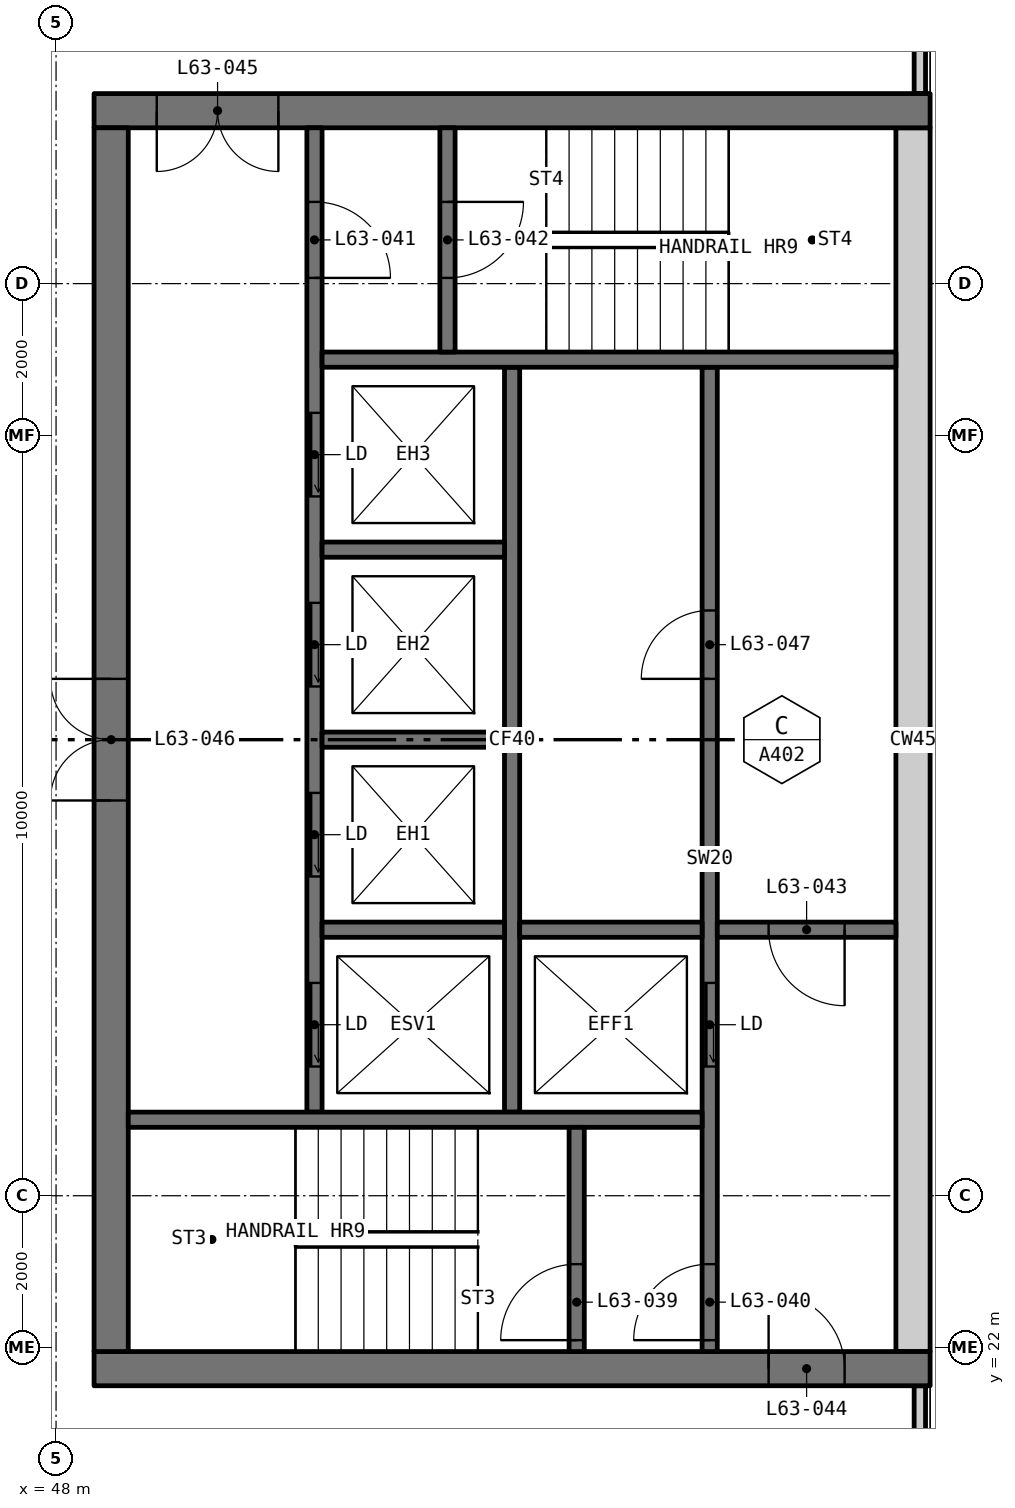
"""IFC4 building model, lengths in metres.
Left out: names, types, materials, properties, quantities, classifications, styles, units other than length and angle.
Written with IfcOpenShell. Run it as: python <this file> out.ifc"""

import sys

from ifc_helpers import new_model, si_unit, direction, frame, frame_2d, origin, place, context, subcontext, project, spatial, rectangle, extrude, element, fill, save


model = new_model("IFC4")
c1 = context("Model", 3, precision=1e-05, world=origin(), true_north=direction((0.0, 1.0)))
c2 = subcontext(c1, "Body", "Model", "MODEL_VIEW")
j1 = project(units=[si_unit("LENGTHUNIT", "METRE"), si_unit("PLANEANGLEUNIT", "RADIAN")], contexts=[c1])
p1 = place(None, origin())
s1 = spatial("IfcSite", under=j1, at=p1, CompositionType="ELEMENT")
p2 = place(p1, origin())
s2 = spatial("IfcBuilding", under=s1, at=p2, CompositionType="ELEMENT")
p3 = place(p2, frame((0.0, 0.0, 235.2)))
s3 = spatial("IfcBuildingStorey", under=s2, at=p3, CompositionType="ELEMENT", Elevation=235.2)
for number, where, z_axis, x_axis in (
    (1, (59.365, 18.71, 0.0), (0.0, 0.0, 1.0), (0.0, 1.0, 0.0)),
    (2, (59.365, 38.5, 0.0), (0.0, 0.0, 1.0), (0.0, 1.0, 0.0)),
):
    element("IfcWall", number, at=place(p3, frame(where, z_axis=z_axis, x_axis=x_axis)), inside=s3, PredefinedType="ELEMENTEDWALL", context=c2, shape_type="SweptSolid", body=[
        extrude(rectangle(XDim=2.79, YDim=0.15, at=frame_2d((1.395, 0.0))), origin(), (0.0, 0.0, 1.0), 3.05),
    ])
p4 = place(p3, frame((59.5, 21.725, 0.0), z_axis=(0.0, 0.0, 1.0), x_axis=(-1.0, 0.0, 0.0)))
e3 = element("IfcWall", 3, at=p4, inside=s3, PredefinedType="SHEAR", context=c2, shape_type="SweptSolid", body=[
    extrude(rectangle(XDim=11.0, YDim=0.45, at=frame_2d((5.5, 0.0))), origin(), (0.0, 0.0, 1.0), 3.05),
])
p5 = place(p4, frame((1.125, 0.0, 0.0)))
e4 = element("IfcOpeningElement", 4, at=p5, cuts=e3, PredefinedType="OPENING", context=c2, shape_type="SweptSolid", body=[
    extrude(rectangle(XDim=1.0, YDim=2.1, at=frame_2d((0.5, 1.05))), frame((0.0, 0.235, 0.0), z_axis=(0.0, -1.0, 0.0), x_axis=(1.0, 0.0, 0.0)), (0.0, 0.0, 1.0), 0.47),
])
p6 = place(p3, frame((59.5, 38.275, 0.0), z_axis=(0.0, 0.0, 1.0), x_axis=(-1.0, 0.0, 0.0)))
e5 = element("IfcWall", 5, at=p6, inside=s3, PredefinedType="SHEAR", context=c2, shape_type="SweptSolid", body=[
    extrude(rectangle(XDim=11.0, YDim=0.45, at=frame_2d((5.5, 0.0))), origin(), (0.0, 0.0, 1.0), 3.05),
])
p7 = place(p6, frame((8.575, 0.0, 0.0)))
e6 = element("IfcOpeningElement", 6, at=p7, cuts=e5, PredefinedType="OPENING", context=c2, shape_type="SweptSolid", body=[
    extrude(rectangle(XDim=1.6, YDim=2.1, at=frame_2d((0.8, 1.05))), frame((0.0, 0.235, 0.0), z_axis=(0.0, -1.0, 0.0), x_axis=(1.0, 0.0, 0.0)), (0.0, 0.0, 1.0), 0.47),
])
p8 = place(p3, frame((59.275, 21.95, 0.0), z_axis=(0.0, 0.0, 1.0), x_axis=(0.0, 1.0, 0.0)))
e7 = element("IfcWall", 7, at=p8, inside=s3, PredefinedType="SHEAR", context=c2, shape_type="SweptSolid", body=[
    extrude(rectangle(XDim=16.1, YDim=0.45, at=frame_2d((8.05, 0.0))), origin(), (0.0, 0.0, 1.0), 3.05),
])
p9 = place(p3, frame((48.725, 21.95, 0.0), z_axis=(0.0, 0.0, 1.0), x_axis=(0.0, 1.0, 0.0)))
e8 = element("IfcWall", 8, at=p9, inside=s3, PredefinedType="SHEAR", context=c2, shape_type="SweptSolid", body=[
    extrude(rectangle(XDim=16.1, YDim=0.45, at=frame_2d((8.05, 0.0))), origin(), (0.0, 0.0, 1.0), 3.05),
])
p10 = place(p9, frame((7.25, 0.0, 0.0)))
e9 = element("IfcOpeningElement", 9, at=p10, cuts=e8, PredefinedType="OPENING", context=c2, shape_type="SweptSolid", body=[
    extrude(rectangle(XDim=1.6, YDim=2.1, at=frame_2d((0.8, 1.05))), frame((0.0, 0.235, 0.0), z_axis=(0.0, -1.0, 0.0), x_axis=(1.0, 0.0, 0.0)), (0.0, 0.0, 1.0), 0.47),
])
p11 = place(p3, frame((56.6, 21.95, 0.0), z_axis=(0.0, 0.0, 1.0), x_axis=(0.0, 1.0, 0.0)))
e10 = element("IfcWall", 10, at=p11, inside=s3, PredefinedType="SOLIDWALL", context=c2, shape_type="SweptSolid", body=[
    extrude(rectangle(XDim=12.95, YDim=0.2, at=frame_2d((6.475, 0.0))), origin(), (0.0, 0.0, 1.0), 3.05),
])
p12 = place(p11, frame((3.75, 0.0, 0.0)))
e11 = element("IfcOpeningElement", 11, at=p12, cuts=e10, PredefinedType="OPENING", context=c2, shape_type="SweptSolid", body=[
    extrude(rectangle(XDim=1.1, YDim=2.1, at=frame_2d((0.55, 1.05))), frame((0.0, 0.11, 0.0), z_axis=(0.0, -1.0, 0.0), x_axis=(1.0, 0.0, 0.0)), (0.0, 0.0, 1.0), 0.22),
])
p13 = place(p11, frame((0.15, 0.0, 0.0)))
e12 = element("IfcOpeningElement", 12, at=p13, cuts=e10, PredefinedType="OPENING", context=c2, shape_type="SweptSolid", body=[
    extrude(rectangle(XDim=1.0, YDim=2.1, at=frame_2d((0.5, 1.05))), frame((0.0, 0.11, 0.0), z_axis=(0.0, -1.0, 0.0), x_axis=(1.0, 0.0, 0.0)), (0.0, 0.0, 1.0), 0.22),
])
p14 = place(p11, frame((8.85, 0.0, 0.0)))
e13 = element("IfcOpeningElement", 13, at=p14, cuts=e10, PredefinedType="OPENING", context=c2, shape_type="SweptSolid", body=[
    extrude(rectangle(XDim=0.9, YDim=2.1, at=frame_2d((0.45, 1.05))), frame((0.0, 0.11, 0.0), z_axis=(0.0, -1.0, 0.0), x_axis=(1.0, 0.0, 0.0)), (0.0, 0.0, 1.0), 0.22),
])
p15 = place(p3, frame((51.4, 25.1, 0.0), z_axis=(0.0, 0.0, 1.0), x_axis=(0.0, 1.0, 0.0)))
e14 = element("IfcWall", 14, at=p15, inside=s3, PredefinedType="SOLIDWALL", context=c2, shape_type="SweptSolid", body=[
    extrude(rectangle(XDim=12.95, YDim=0.2, at=frame_2d((6.475, 0.0))), origin(), (0.0, 0.0, 1.0), 3.05),
])
p16 = place(p15, frame((0.6, 0.0, 0.0)))
e15 = element("IfcOpeningElement", 15, at=p16, cuts=e14, PredefinedType="OPENING", context=c2, shape_type="SweptSolid", body=[
    extrude(rectangle(XDim=1.1, YDim=2.1, at=frame_2d((0.55, 1.05))), frame((0.0, 0.11, 0.0), z_axis=(0.0, -1.0, 0.0), x_axis=(1.0, 0.0, 0.0)), (0.0, 0.0, 1.0), 0.22),
])
p17 = place(p15, frame((3.1, 0.0, 0.0)))
e16 = element("IfcOpeningElement", 16, at=p17, cuts=e14, PredefinedType="OPENING", context=c2, shape_type="SweptSolid", body=[
    extrude(rectangle(XDim=1.1, YDim=2.1, at=frame_2d((0.55, 1.05))), frame((0.0, 0.11, 0.0), z_axis=(0.0, -1.0, 0.0), x_axis=(1.0, 0.0, 0.0)), (0.0, 0.0, 1.0), 0.22),
])
p18 = place(p15, frame((5.6, 0.0, 0.0)))
e17 = element("IfcOpeningElement", 17, at=p18, cuts=e14, PredefinedType="OPENING", context=c2, shape_type="SweptSolid", body=[
    extrude(rectangle(XDim=1.1, YDim=2.1, at=frame_2d((0.55, 1.05))), frame((0.0, 0.11, 0.0), z_axis=(0.0, -1.0, 0.0), x_axis=(1.0, 0.0, 0.0)), (0.0, 0.0, 1.0), 0.22),
])
p19 = place(p15, frame((8.1, 0.0, 0.0)))
e18 = element("IfcOpeningElement", 18, at=p19, cuts=e14, PredefinedType="OPENING", context=c2, shape_type="SweptSolid", body=[
    extrude(rectangle(XDim=1.1, YDim=2.1, at=frame_2d((0.55, 1.05))), frame((0.0, 0.11, 0.0), z_axis=(0.0, -1.0, 0.0), x_axis=(1.0, 0.0, 0.0)), (0.0, 0.0, 1.0), 0.22),
])
p20 = place(p15, frame((10.975, 0.0, 0.0)))
e19 = element("IfcOpeningElement", 19, at=p20, cuts=e14, PredefinedType="OPENING", context=c2, shape_type="SweptSolid", body=[
    extrude(rectangle(XDim=1.0, YDim=2.1, at=frame_2d((0.5, 1.05))), frame((0.0, 0.11, 0.0), z_axis=(0.0, -1.0, 0.0), x_axis=(1.0, 0.0, 0.0)), (0.0, 0.0, 1.0), 0.22),
])
p21 = place(p3, frame((54.0, 25.1, 0.0), z_axis=(0.0, 0.0, 1.0), x_axis=(0.0, 1.0, 0.0)))
e20 = element("IfcWall", 20, at=p21, inside=s3, PredefinedType="SOLIDWALL", context=c2, shape_type="SweptSolid", body=[
    extrude(rectangle(XDim=9.8, YDim=0.2, at=frame_2d((4.9, 0.0))), origin(), (0.0, 0.0, 1.0), 3.05),
])
for number, where, z_axis, x_axis in (
    (21, (56.5, 25.0, 0.0), (0.0, 0.0, 1.0), (-1.0, 0.0, 0.0)),
    (22, (59.05, 35.0, 0.0), (0.0, 0.0, 1.0), (-1.0, 0.0, 0.0)),
):
    element("IfcWall", number, at=place(p3, frame(where, z_axis=z_axis, x_axis=x_axis)), inside=s3, PredefinedType="SOLIDWALL", context=c2, shape_type="SweptSolid", body=[
        extrude(rectangle(XDim=7.55, YDim=0.2, at=frame_2d((3.775, 0.0))), origin(), (0.0, 0.0, 1.0), 3.05),
    ])
p22 = place(p3, frame((59.05, 27.5, 0.0), z_axis=(0.0, 0.0, 1.0), x_axis=(-1.0, 0.0, 0.0)))
e23 = element("IfcWall", 23, at=p22, inside=s3, PredefinedType="SOLIDWALL", context=c2, shape_type="SweptSolid", body=[
    extrude(rectangle(XDim=2.35, YDim=0.2, at=frame_2d((1.175, 0.0))), origin(), (0.0, 0.0, 1.0), 3.05),
])
p23 = place(p22, frame((0.675, 0.0, 0.0)))
e24 = element("IfcOpeningElement", 24, at=p23, cuts=e23, PredefinedType="OPENING", context=c2, shape_type="SweptSolid", body=[
    extrude(rectangle(XDim=1.0, YDim=2.1, at=frame_2d((0.5, 1.05))), frame((0.0, 0.11, 0.0), z_axis=(0.0, -1.0, 0.0), x_axis=(1.0, 0.0, 0.0)), (0.0, 0.0, 1.0), 0.22),
])
p24 = place(p3, frame((54.85, 21.95, 0.0), z_axis=(0.0, 0.0, 1.0), x_axis=(0.0, 1.0, 0.0)))
e25 = element("IfcWall", 25, at=p24, inside=s3, PredefinedType="SOLIDWALL", context=c2, shape_type="SweptSolid", body=[
    extrude(rectangle(XDim=2.95, YDim=0.2, at=frame_2d((1.475, 0.0))), origin(), (0.0, 0.0, 1.0), 3.05),
])
p25 = place(p24, frame((0.15, 0.0, 0.0)))
e26 = element("IfcOpeningElement", 26, at=p25, cuts=e25, PredefinedType="OPENING", context=c2, shape_type="SweptSolid", body=[
    extrude(rectangle(XDim=1.0, YDim=2.1, at=frame_2d((0.5, 1.05))), frame((0.0, 0.11, 0.0), z_axis=(0.0, -1.0, 0.0), x_axis=(1.0, 0.0, 0.0)), (0.0, 0.0, 1.0), 0.22),
])
p26 = place(p3, frame((53.15, 35.1, 0.0), z_axis=(0.0, 0.0, 1.0), x_axis=(0.0, 1.0, 0.0)))
e27 = element("IfcWall", 27, at=p26, inside=s3, PredefinedType="SOLIDWALL", context=c2, shape_type="SweptSolid", body=[
    extrude(rectangle(XDim=2.95, YDim=0.2, at=frame_2d((1.475, 0.0))), origin(), (0.0, 0.0, 1.0), 3.05),
])
p27 = place(p26, frame((0.975, 0.0, 0.0)))
e28 = element("IfcOpeningElement", 28, at=p27, cuts=e27, PredefinedType="OPENING", context=c2, shape_type="SweptSolid", body=[
    extrude(rectangle(XDim=1.0, YDim=2.1, at=frame_2d((0.5, 1.05))), frame((0.0, 0.11, 0.0), z_axis=(0.0, -1.0, 0.0), x_axis=(1.0, 0.0, 0.0)), (0.0, 0.0, 1.0), 0.22),
])
for number, where, z_axis, x_axis in (
    (29, (56.5, 27.5, 0.0), (0.0, 0.0, 1.0), (-1.0, 0.0, 0.0)),
    (30, (53.9, 27.5, 0.0), (0.0, 0.0, 1.0), (-1.0, 0.0, 0.0)),
    (31, (53.9, 30.0, 0.0), (0.0, 0.0, 1.0), (-1.0, 0.0, 0.0)),
    (32, (53.9, 32.5, 0.0), (0.0, 0.0, 1.0), (-1.0, 0.0, 0.0)),
):
    element("IfcWall", number, at=place(p3, frame(where, z_axis=z_axis, x_axis=x_axis)), inside=s3, PredefinedType="SOLIDWALL", context=c2, shape_type="SweptSolid", body=[
        extrude(rectangle(XDim=2.4, YDim=0.2, at=frame_2d((1.2, 0.0))), origin(), (0.0, 0.0, 1.0), 3.05),
    ])
p28 = place(p16, origin())
e33 = element("IfcDoor", 33, at=p28, inside=s3, OperationType="SLIDING_TO_LEFT", PredefinedType="DOOR", context=c2, shape_type="SweptSolid", body=[
    extrude(rectangle(XDim=1.1, YDim=2.1, at=frame_2d((0.55, 1.05))), frame((0.0, 0.025, 0.0), z_axis=(0.0, -1.0, 0.0), x_axis=(1.0, 0.0, 0.0)), (0.0, 0.0, 1.0), 0.05),
])
fill(e15, e33)
p29 = place(p17, origin())
e34 = element("IfcDoor", 34, at=p29, inside=s3, OperationType="SLIDING_TO_LEFT", PredefinedType="DOOR", context=c2, shape_type="SweptSolid", body=[
    extrude(rectangle(XDim=1.1, YDim=2.1, at=frame_2d((0.55, 1.05))), frame((0.0, 0.025, 0.0), z_axis=(0.0, -1.0, 0.0), x_axis=(1.0, 0.0, 0.0)), (0.0, 0.0, 1.0), 0.05),
])
fill(e16, e34)
p30 = place(p18, origin())
e35 = element("IfcDoor", 35, at=p30, inside=s3, OperationType="SLIDING_TO_LEFT", PredefinedType="DOOR", context=c2, shape_type="SweptSolid", body=[
    extrude(rectangle(XDim=1.1, YDim=2.1, at=frame_2d((0.55, 1.05))), frame((0.0, 0.025, 0.0), z_axis=(0.0, -1.0, 0.0), x_axis=(1.0, 0.0, 0.0)), (0.0, 0.0, 1.0), 0.05),
])
fill(e17, e35)
p31 = place(p19, origin())
e36 = element("IfcDoor", 36, at=p31, inside=s3, OperationType="SLIDING_TO_LEFT", PredefinedType="DOOR", context=c2, shape_type="SweptSolid", body=[
    extrude(rectangle(XDim=1.1, YDim=2.1, at=frame_2d((0.55, 1.05))), frame((0.0, 0.025, 0.0), z_axis=(0.0, -1.0, 0.0), x_axis=(1.0, 0.0, 0.0)), (0.0, 0.0, 1.0), 0.05),
])
fill(e18, e36)
p32 = place(p12, origin())
e37 = element("IfcDoor", 37, at=p32, inside=s3, OperationType="SLIDING_TO_LEFT", PredefinedType="DOOR", context=c2, shape_type="SweptSolid", body=[
    extrude(rectangle(XDim=1.1, YDim=2.1, at=frame_2d((0.55, 1.05))), frame((0.0, 0.025, 0.0), z_axis=(0.0, -1.0, 0.0), x_axis=(1.0, 0.0, 0.0)), (0.0, 0.0, 1.0), 0.05),
])
fill(e11, e37)
p33 = place(p25, origin())
e38 = element("IfcDoor", 38, at=p33, inside=s3, OperationType="SINGLE_SWING_RIGHT", PredefinedType="DOOR", context=c2, shape_type="SweptSolid", body=[
    extrude(rectangle(XDim=1.0, YDim=2.1, at=frame_2d((0.5, 1.05))), frame((0.0, 0.025, 0.0), z_axis=(0.0, -1.0, 0.0), x_axis=(1.0, 0.0, 0.0)), (0.0, 0.0, 1.0), 0.05),
])
fill(e26, e38)
p34 = place(p13, origin())
e39 = element("IfcDoor", 39, at=p34, inside=s3, OperationType="SINGLE_SWING_RIGHT", PredefinedType="DOOR", context=c2, shape_type="SweptSolid", body=[
    extrude(rectangle(XDim=1.0, YDim=2.1, at=frame_2d((0.5, 1.05))), frame((0.0, 0.025, 0.0), z_axis=(0.0, -1.0, 0.0), x_axis=(1.0, 0.0, 0.0)), (0.0, 0.0, 1.0), 0.05),
])
fill(e12, e39)
p35 = place(p20, frame((1.0, 0.0, 0.0), x_axis=(-1.0, 0.0, 0.0)))
e40 = element("IfcDoor", 40, at=p35, inside=s3, OperationType="SINGLE_SWING_LEFT", PredefinedType="DOOR", context=c2, shape_type="SweptSolid", body=[
    extrude(rectangle(XDim=1.0, YDim=2.1, at=frame_2d((0.5, 1.05))), frame((0.0, 0.025, 0.0), z_axis=(0.0, -1.0, 0.0), x_axis=(1.0, 0.0, 0.0)), (0.0, 0.0, 1.0), 0.05),
])
fill(e19, e40)
p36 = place(p27, frame((1.0, 0.0, 0.0), x_axis=(-1.0, 0.0, 0.0)))
e41 = element("IfcDoor", 41, at=p36, inside=s3, OperationType="SINGLE_SWING_RIGHT", PredefinedType="DOOR", context=c2, shape_type="SweptSolid", body=[
    extrude(rectangle(XDim=1.0, YDim=2.1, at=frame_2d((0.5, 1.05))), frame((0.0, 0.025, 0.0), z_axis=(0.0, -1.0, 0.0), x_axis=(1.0, 0.0, 0.0)), (0.0, 0.0, 1.0), 0.05),
])
fill(e28, e41)
p37 = place(p23, origin())
e42 = element("IfcDoor", 42, at=p37, inside=s3, OperationType="SINGLE_SWING_RIGHT", PredefinedType="DOOR", context=c2, shape_type="SweptSolid", body=[
    extrude(rectangle(XDim=1.0, YDim=2.1, at=frame_2d((0.5, 1.05))), frame((0.0, 0.025, 0.0), z_axis=(0.0, -1.0, 0.0), x_axis=(1.0, 0.0, 0.0)), (0.0, 0.0, 1.0), 0.05),
])
fill(e24, e42)
p38 = place(p5, frame((1.0, 0.0, 0.0), x_axis=(-1.0, 0.0, 0.0)))
e43 = element("IfcDoor", 43, at=p38, inside=s3, OperationType="SINGLE_SWING_RIGHT", PredefinedType="DOOR", context=c2, shape_type="SweptSolid", body=[
    extrude(rectangle(XDim=1.0, YDim=2.1, at=frame_2d((0.5, 1.05))), frame((0.0, 0.025, 0.0), z_axis=(0.0, -1.0, 0.0), x_axis=(1.0, 0.0, 0.0)), (0.0, 0.0, 1.0), 0.05),
])
fill(e4, e43)
p39 = place(p7, origin())
e44 = element("IfcDoor", 44, at=p39, inside=s3, OperationType="DOUBLE_DOOR_SINGLE_SWING", PredefinedType="DOOR", context=c2, shape_type="SweptSolid", body=[
    extrude(rectangle(XDim=1.6, YDim=2.1, at=frame_2d((0.8, 1.05))), frame((0.0, 0.025, 0.0), z_axis=(0.0, -1.0, 0.0), x_axis=(1.0, 0.0, 0.0)), (0.0, 0.0, 1.0), 0.05),
])
fill(e6, e44)
p40 = place(p10, origin())
e45 = element("IfcDoor", 45, at=p40, inside=s3, OperationType="DOUBLE_DOOR_SINGLE_SWING", PredefinedType="DOOR", context=c2, shape_type="SweptSolid", body=[
    extrude(rectangle(XDim=1.6, YDim=2.1, at=frame_2d((0.8, 1.05))), frame((0.0, 0.025, 0.0), z_axis=(0.0, -1.0, 0.0), x_axis=(1.0, 0.0, 0.0)), (0.0, 0.0, 1.0), 0.05),
])
fill(e9, e45)
p41 = place(p14, origin())
e46 = element("IfcDoor", 46, at=p41, inside=s3, OperationType="SINGLE_SWING_RIGHT", PredefinedType="DOOR", context=c2, shape_type="SweptSolid", body=[
    extrude(rectangle(XDim=0.9, YDim=2.1, at=frame_2d((0.45, 1.05))), frame((0.0, 0.025, 0.0), z_axis=(0.0, -1.0, 0.0), x_axis=(1.0, 0.0, 0.0)), (0.0, 0.0, 1.0), 0.05),
])
fill(e13, e46)
save(model, sys.argv[1])
